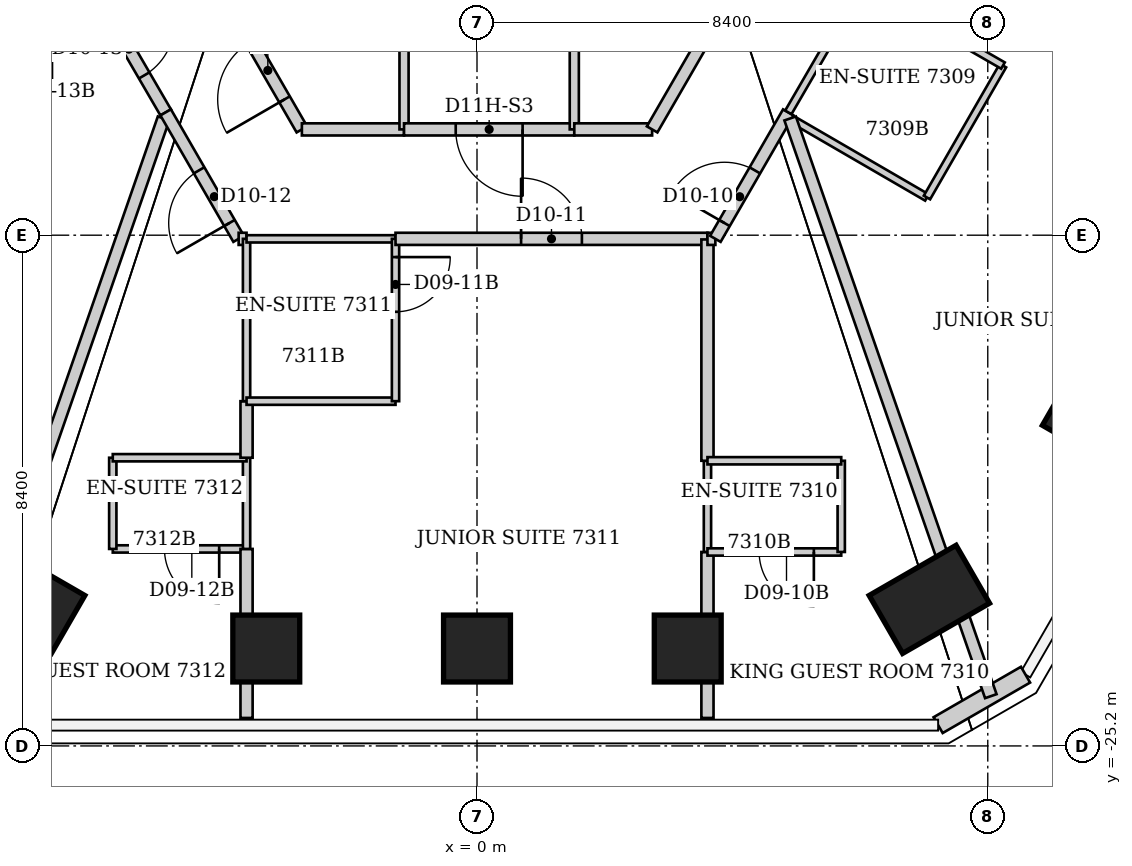
"""IFC4 building model, lengths in metres.
Left out: names, types, materials, properties, quantities, classifications, styles, units other than length and angle.
Written with IfcOpenShell. Run it as: python <this file> out.ifc"""

import sys

from ifc_helpers import new_model, si_unit, direction, frame, frame_2d, origin, origin_2d, place, context, subcontext, project, spatial, rectangle, extrude, element, fill, save


model = new_model("IFC4")
c1 = context("Model", 3, precision=1e-05, world=origin(), true_north=direction((0.0, 1.0)))
c2 = subcontext(c1, "Body", "Model", "MODEL_VIEW")
j1 = project(units=[si_unit("LENGTHUNIT", "METRE"), si_unit("PLANEANGLEUNIT", "RADIAN")], contexts=[c1])
p1 = place(None, origin())
s1 = spatial("IfcSite", under=j1, at=p1, CompositionType="ELEMENT")
p2 = place(p1, origin())
s2 = spatial("IfcBuilding", under=s1, at=p2, CompositionType="ELEMENT")
p3 = place(p2, frame((0.0, 0.0, 291.2)))
s3 = spatial("IfcBuildingStorey", under=s2, at=p3, CompositionType="ELEMENT", Elevation=291.2)
p4 = place(p3, frame((10.05, -19.725, 0.0), z_axis=(0.0, 0.0, 1.0), x_axis=(0.866025403784, -0.5, 0.0)))
e1 = element("IfcColumn", 1, at=p4, inside=s3, PredefinedType="COLUMN", context=c2, shape_type="SweptSolid", body=[
    extrude(rectangle(XDim=1.1, YDim=1.1, at=origin_2d()), origin(), (0.0, 0.0, 1.0), 3.8),
])
p5 = place(p3, frame((7.439, -22.79, 0.0), z_axis=(0.0, 0.0, 1.0), x_axis=(0.5, -0.866025403784, 0.0)))
e2 = element("IfcColumn", 2, at=p5, inside=s3, PredefinedType="COLUMN", context=c2, shape_type="SweptSolid", body=[
    extrude(rectangle(XDim=1.1, YDim=1.65, at=origin_2d()), origin(), (0.0, 0.0, 1.0), 3.8),
])
for number, where, z_axis, x_axis in (
    (3, (3.466, -23.598, 0.0), (0.0, 0.0, 1.0), (0.0, -1.0, 0.0)),
    (4, (0.0, -23.598, 0.0), (0.0, 0.0, 1.0), (0.0, -1.0, 0.0)),
    (5, (-3.466, -23.598, 0.0), (0.0, 0.0, 1.0), (0.0, -1.0, 0.0)),
):
    element("IfcColumn", number, at=place(p3, frame(where, z_axis=z_axis, x_axis=x_axis)), inside=s3, PredefinedType="COLUMN", context=c2, shape_type="SweptSolid", body=[
        extrude(rectangle(XDim=1.1, YDim=1.1, at=origin_2d()), origin(), (0.0, 0.0, 1.0), 3.8),
    ])
p6 = place(p3, frame((-7.439, -22.79, 0.0), z_axis=(0.0, 0.0, 1.0), x_axis=(-0.5, -0.866025403784, 0.0)))
e6 = element("IfcColumn", 6, at=p6, inside=s3, PredefinedType="COLUMN", context=c2, shape_type="SweptSolid", body=[
    extrude(rectangle(XDim=1.1, YDim=1.65, at=origin_2d()), origin(), (0.0, 0.0, 1.0), 3.8),
])
p7 = place(p3, frame((9.021, -24.028, 0.0), z_axis=(0.0, 0.0, 1.0), x_axis=(-0.865989634427, -0.500061949227, 0.0)))
e7 = element("IfcWall", 7, at=p7, inside=s3, PredefinedType="SOLIDWALL", context=c2, shape_type="SweptSolid", body=[
    extrude(rectangle(XDim=1.66, YDim=0.3, at=frame_2d((0.83, 0.0))), origin(), (0.0, 0.0, 1.0), 3.64),
])
p8 = place(p3, frame((-8.59, -14.01, 0.0), z_axis=(0.0, 0.0, 1.0), x_axis=(0.865155281359, 0.50150407689, 0.0)))
e8 = element("IfcWall", 8, at=p8, inside=s3, PredefinedType="PARTITIONING", context=c2, shape_type="SweptSolid", body=[
    extrude(rectangle(XDim=2.612, YDim=0.12, at=frame_2d((1.306, 0.0))), origin(), (0.0, 0.0, 1.0), 3.64),
])
p9 = place(p8, frame((1.412, 0.0, 0.0)))
e9 = element("IfcOpeningElement", 9, at=p9, cuts=e8, PredefinedType="OPENING", context=c2, shape_type="SweptSolid", body=[
    extrude(rectangle(XDim=0.9, YDim=2.03, at=frame_2d((0.45, 1.015))), frame((0.0, 0.06, 0.0), z_axis=(0.0, -1.0, 0.0), x_axis=(1.0, 0.0, 0.0)), (0.0, 0.0, 1.0), 0.12),
])
p10 = place(p3, frame((-8.45, -24.382, 0.0), z_axis=(0.0, 0.0, 1.0), x_axis=(0.327695764917, 0.944783300898, 0.0)))
e10 = element("IfcWall", 10, at=p10, inside=s3, PredefinedType="PARTITIONING", context=c2, shape_type="SweptSolid", body=[
    extrude(rectangle(XDim=10.058, YDim=0.2, at=frame_2d((5.029, 0.0))), origin(), (0.0, 0.0, 1.0), 3.64),
])
p11 = place(p3, frame((-6.33, -12.7, 0.0), z_axis=(0.0, 0.0, 1.0), x_axis=(0.502810888564, -0.864396442809, 0.0)))
e11 = element("IfcWall", 11, at=p11, inside=s3, PredefinedType="PARTITIONING", context=c2, shape_type="SweptSolid", body=[
    extrude(rectangle(XDim=2.406, YDim=0.2, at=frame_2d((1.203, 0.0))), origin(), (0.0, 0.0, 1.0), 3.64),
])
p12 = place(p11, frame((0.703, 0.0, 0.0)))
e12 = element("IfcOpeningElement", 12, at=p12, cuts=e11, PredefinedType="OPENING", context=c2, shape_type="SweptSolid", body=[
    extrude(rectangle(XDim=1.0, YDim=2.13, at=frame_2d((0.5, 1.065))), frame((0.0, 0.1, 0.0), z_axis=(0.0, -1.0, 0.0), x_axis=(1.0, 0.0, 0.0)), (0.0, 0.0, 1.0), 0.2),
])
p13 = place(p3, frame((-5.99, -21.96, 0.0), z_axis=(0.0, 0.0, 1.0), x_axis=(1.0, 0.0, 0.0)))
e13 = element("IfcWall", 13, at=p13, inside=s3, PredefinedType="PARTITIONING", context=c2, shape_type="SweptSolid", body=[
    extrude(rectangle(XDim=2.2, YDim=0.12, at=frame_2d((1.1, 0.0))), origin(), (0.0, 0.0, 1.0), 3.64),
])
p14 = place(p13, frame((0.85, 0.0, 0.0)))
e14 = element("IfcOpeningElement", 14, at=p14, cuts=e13, PredefinedType="OPENING", context=c2, shape_type="SweptSolid", body=[
    extrude(rectangle(XDim=0.9, YDim=2.03, at=frame_2d((0.45, 1.015))), frame((0.0, 0.06, 0.0), z_axis=(0.0, -1.0, 0.0), x_axis=(1.0, 0.0, 0.0)), (0.0, 0.0, 1.0), 0.12),
])
p15 = place(p3, frame((-5.99, -20.46, 0.0), z_axis=(0.0, 0.0, 1.0), x_axis=(0.0, -1.0, 0.0)))
e15 = element("IfcWall", 15, at=p15, inside=s3, PredefinedType="PARTITIONING", context=c2, shape_type="SweptSolid", body=[
    extrude(rectangle(XDim=1.5, YDim=0.12, at=frame_2d((0.75, 0.0))), origin(), (0.0, 0.0, 1.0), 3.64),
])
p16 = place(p3, frame((-5.12, -14.78, 0.0), z_axis=(0.0, 0.0, 1.0), x_axis=(0.499813401482, -0.866133109688, 0.0)))
e16 = element("IfcWall", 16, at=p16, inside=s3, PredefinedType="PARTITIONING", context=c2, shape_type="SweptSolid", body=[
    extrude(rectangle(XDim=2.401, YDim=0.2, at=frame_2d((1.201, 0.0))), origin(), (0.0, 0.0, 1.0), 3.64),
])
p17 = place(p16, frame((1.1, 0.0, 0.0)))
e17 = element("IfcOpeningElement", 17, at=p17, cuts=e16, PredefinedType="OPENING", context=c2, shape_type="SweptSolid", body=[
    extrude(rectangle(XDim=1.0, YDim=2.13, at=frame_2d((0.5, 1.065))), frame((0.0, 0.1, 0.0), z_axis=(0.0, -1.0, 0.0), x_axis=(1.0, 0.0, 0.0)), (0.0, 0.0, 1.0), 0.2),
])
p18 = place(p3, frame((-3.92, -16.86, 0.0), z_axis=(0.0, 0.0, 1.0), x_axis=(1.0, 0.0, 0.0)))
e18 = element("IfcWall", 18, at=p18, inside=s3, PredefinedType="PARTITIONING", context=c2, shape_type="SweptSolid", body=[
    extrude(rectangle(XDim=0.13, YDim=0.2, at=frame_2d((0.065, 0.0))), origin(), (0.0, 0.0, 1.0), 3.64),
])
p19 = place(p3, frame((-3.79, -24.74, 0.0), z_axis=(0.0, 0.0, 1.0), x_axis=(0.0, 1.0, 0.0)))
e19 = element("IfcWall", 19, at=p19, inside=s3, PredefinedType="PARTITIONING", context=c2, shape_type="SweptSolid", body=[
    extrude(rectangle(XDim=2.78, YDim=0.2, at=frame_2d((1.39, 0.0))), origin(), (0.0, 0.0, 1.0), 3.64),
])
p20 = place(p3, frame((-3.79, -21.96, 0.0), z_axis=(0.0, 0.0, 1.0), x_axis=(0.0, 1.0, 0.0)))
e20 = element("IfcWall", 20, at=p20, inside=s3, PredefinedType="PARTITIONING", context=c2, shape_type="SweptSolid", body=[
    extrude(rectangle(XDim=1.5, YDim=0.12, at=frame_2d((0.75, 0.0))), origin(), (0.0, 0.0, 1.0), 3.64),
])
p21 = place(p3, frame((-3.79, -20.46, 0.0), z_axis=(0.0, 0.0, 1.0), x_axis=(-1.0, 0.0, 0.0)))
e21 = element("IfcWall", 21, at=p21, inside=s3, PredefinedType="PARTITIONING", context=c2, shape_type="SweptSolid", body=[
    extrude(rectangle(XDim=2.2, YDim=0.12, at=frame_2d((1.1, 0.0))), origin(), (0.0, 0.0, 1.0), 3.64),
])
p22 = place(p3, frame((-3.79, -20.46, 0.0), z_axis=(0.0, 0.0, 1.0), x_axis=(0.0, 1.0, 0.0)))
e22 = element("IfcWall", 22, at=p22, inside=s3, PredefinedType="PARTITIONING", context=c2, shape_type="SweptSolid", body=[
    extrude(rectangle(XDim=0.93, YDim=0.2, at=frame_2d((0.465, 0.0))), origin(), (0.0, 0.0, 1.0), 3.64),
])
p23 = place(p3, frame((-3.79, -19.53, 0.0), z_axis=(0.0, 0.0, 1.0), x_axis=(0.0, 1.0, 0.0)))
e23 = element("IfcWall", 23, at=p23, inside=s3, PredefinedType="PARTITIONING", context=c2, shape_type="SweptSolid", body=[
    extrude(rectangle(XDim=2.67, YDim=0.12, at=frame_2d((1.335, 0.0))), origin(), (0.0, 0.0, 1.0), 3.64),
])
for number, where, z_axis, x_axis in (
    (24, (-3.79, -19.53, 0.0), (0.0, 0.0, 1.0), (1.0, 0.0, 0.0)),
    (25, (-3.79, -16.86, 0.0), (0.0, 0.0, 1.0), (1.0, 0.0, 0.0)),
):
    element("IfcWall", number, at=place(p3, frame(where, z_axis=z_axis, x_axis=x_axis)), inside=s3, PredefinedType="PARTITIONING", context=c2, shape_type="SweptSolid", body=[
        extrude(rectangle(XDim=2.45, YDim=0.12, at=frame_2d((1.225, 0.0))), origin(), (0.0, 0.0, 1.0), 3.64),
    ])
p24 = place(p3, frame((-2.88, -15.06, 0.0), z_axis=(0.0, 0.0, 1.0), x_axis=(-0.499983441833, 0.866034963436, 0.0)))
e26 = element("IfcWall", 26, at=p24, inside=s3, PredefinedType="PARTITIONING", context=c2, shape_type="SweptSolid", body=[
    extrude(rectangle(XDim=2.24, YDim=0.2, at=frame_2d((1.12, 0.0))), origin(), (0.0, 0.0, 1.0), 3.64),
])
p25 = place(p24, frame((0.57, 0.0, 0.0)))
e27 = element("IfcOpeningElement", 27, at=p25, cuts=e26, PredefinedType="OPENING", context=c2, shape_type="SweptSolid", body=[
    extrude(rectangle(XDim=1.1, YDim=2.2, at=frame_2d((0.55, 1.1))), frame((0.0, 0.1, 0.0), z_axis=(0.0, -1.0, 0.0), x_axis=(1.0, 0.0, 0.0)), (0.0, 0.0, 1.0), 0.2),
])
p26 = place(p3, frame((-1.34, -19.53, 0.0), z_axis=(0.0, 0.0, 1.0), x_axis=(0.0, 1.0, 0.0)))
e28 = element("IfcWall", 28, at=p26, inside=s3, PredefinedType="PARTITIONING", context=c2, shape_type="SweptSolid", body=[
    extrude(rectangle(XDim=2.67, YDim=0.12, at=frame_2d((1.335, 0.0))), origin(), (0.0, 0.0, 1.0), 3.64),
])
p27 = place(p26, frame((1.47, 0.0, 0.0)))
e29 = element("IfcOpeningElement", 29, at=p27, cuts=e28, PredefinedType="OPENING", context=c2, shape_type="SweptSolid", body=[
    extrude(rectangle(XDim=0.9, YDim=2.03, at=frame_2d((0.45, 1.015))), frame((0.0, 0.06, 0.0), z_axis=(0.0, -1.0, 0.0), x_axis=(1.0, 0.0, 0.0)), (0.0, 0.0, 1.0), 0.12),
])
p28 = place(p3, frame((-1.34, -16.86, 0.0), z_axis=(0.0, 0.0, 1.0), x_axis=(1.0, 0.0, 0.0)))
e30 = element("IfcWall", 30, at=p28, inside=s3, PredefinedType="PARTITIONING", context=c2, shape_type="SweptSolid", body=[
    extrude(rectangle(XDim=5.13, YDim=0.2, at=frame_2d((2.565, 0.0))), origin(), (0.0, 0.0, 1.0), 3.64),
])
p29 = place(p28, frame((2.065, 0.0, 0.0)))
e31 = element("IfcOpeningElement", 31, at=p29, cuts=e30, PredefinedType="OPENING", context=c2, shape_type="SweptSolid", body=[
    extrude(rectangle(XDim=1.0, YDim=2.13, at=frame_2d((0.5, 1.065))), frame((0.0, 0.1, 0.0), z_axis=(0.0, -1.0, 0.0), x_axis=(1.0, 0.0, 0.0)), (0.0, 0.0, 1.0), 0.2),
])
p30 = place(p3, frame((-1.2, -15.06, 0.0), z_axis=(0.0, 0.0, 1.0), x_axis=(-1.0, 0.0, 0.0)))
e32 = element("IfcWall", 32, at=p30, inside=s3, PredefinedType="PARTITIONING", context=c2, shape_type="SweptSolid", body=[
    extrude(rectangle(XDim=1.68, YDim=0.2, at=frame_2d((0.84, 0.0))), origin(), (0.0, 0.0, 1.0), 3.64),
])
p31 = place(p3, frame((-1.2, -6.7, 0.0), z_axis=(0.0, 0.0, 1.0), x_axis=(0.0, -1.0, 0.0)))
e33 = element("IfcWall", 33, at=p31, inside=s3, PredefinedType="PARTITIONING", context=c2, shape_type="SweptSolid", body=[
    extrude(rectangle(XDim=8.36, YDim=0.15, at=frame_2d((4.18, 0.0))), origin(), (0.0, 0.0, 1.0), 3.64),
])
p32 = place(p3, frame((1.6, -15.06, 0.0), z_axis=(0.0, 0.0, 1.0), x_axis=(-1.0, 0.0, 0.0)))
e34 = element("IfcWall", 34, at=p32, inside=s3, PredefinedType="PARTITIONING", context=c2, shape_type="SweptSolid", body=[
    extrude(rectangle(XDim=2.8, YDim=0.2, at=frame_2d((1.4, 0.0))), origin(), (0.0, 0.0, 1.0), 3.64),
])
p33 = place(p32, frame((0.85, 0.0, 0.0)))
e35 = element("IfcOpeningElement", 35, at=p33, cuts=e34, PredefinedType="OPENING", context=c2, shape_type="SweptSolid", body=[
    extrude(rectangle(XDim=1.1, YDim=2.2, at=frame_2d((0.55, 1.1))), frame((0.0, 0.1, 0.0), z_axis=(0.0, -1.0, 0.0), x_axis=(1.0, 0.0, 0.0)), (0.0, 0.0, 1.0), 0.2),
])
p34 = place(p3, frame((1.6, -6.7, 0.0), z_axis=(0.0, 0.0, 1.0), x_axis=(0.0, -1.0, 0.0)))
e36 = element("IfcWall", 36, at=p34, inside=s3, PredefinedType="PARTITIONING", context=c2, shape_type="SweptSolid", body=[
    extrude(rectangle(XDim=8.36, YDim=0.15, at=frame_2d((4.18, 0.0))), origin(), (0.0, 0.0, 1.0), 2.86),
])
p35 = place(p3, frame((2.88, -15.06, 0.0), z_axis=(0.0, 0.0, 1.0), x_axis=(-1.0, 0.0, 0.0)))
e37 = element("IfcWall", 37, at=p35, inside=s3, PredefinedType="PARTITIONING", context=c2, shape_type="SweptSolid", body=[
    extrude(rectangle(XDim=1.28, YDim=0.2, at=frame_2d((0.64, 0.0))), origin(), (0.0, 0.0, 1.0), 3.64),
])
p36 = place(p3, frame((3.79, -24.74, 0.0), z_axis=(0.0, 0.0, 1.0), x_axis=(0.0, 1.0, 0.0)))
e38 = element("IfcWall", 38, at=p36, inside=s3, PredefinedType="PARTITIONING", context=c2, shape_type="SweptSolid", body=[
    extrude(rectangle(XDim=2.73, YDim=0.2, at=frame_2d((1.365, 0.0))), origin(), (0.0, 0.0, 1.0), 3.64),
])
p37 = place(p3, frame((3.79, -22.01, 0.0), z_axis=(0.0, 0.0, 1.0), x_axis=(0.0, 1.0, 0.0)))
e39 = element("IfcWall", 39, at=p37, inside=s3, PredefinedType="PARTITIONING", context=c2, shape_type="SweptSolid", body=[
    extrude(rectangle(XDim=1.5, YDim=0.12, at=frame_2d((0.75, 0.0))), origin(), (0.0, 0.0, 1.0), 3.64),
])
p38 = place(p3, frame((3.79, -22.01, 0.0), z_axis=(0.0, 0.0, 1.0), x_axis=(1.0, 0.0, 0.0)))
e40 = element("IfcWall", 40, at=p38, inside=s3, PredefinedType="PARTITIONING", context=c2, shape_type="SweptSolid", body=[
    extrude(rectangle(XDim=2.2, YDim=0.12, at=frame_2d((1.1, 0.0))), origin(), (0.0, 0.0, 1.0), 3.64),
])
p39 = place(p38, frame((0.85, 0.0, 0.0)))
e41 = element("IfcOpeningElement", 41, at=p39, cuts=e40, PredefinedType="OPENING", context=c2, shape_type="SweptSolid", body=[
    extrude(rectangle(XDim=0.9, YDim=2.03, at=frame_2d((0.45, 1.015))), frame((0.0, 0.06, 0.0), z_axis=(0.0, -1.0, 0.0), x_axis=(1.0, 0.0, 0.0)), (0.0, 0.0, 1.0), 0.12),
])
p40 = place(p3, frame((3.79, -20.51, 0.0), z_axis=(0.0, 0.0, 1.0), x_axis=(0.0, 1.0, 0.0)))
e42 = element("IfcWall", 42, at=p40, inside=s3, PredefinedType="PARTITIONING", context=c2, shape_type="SweptSolid", body=[
    extrude(rectangle(XDim=3.64, YDim=0.2, at=frame_2d((1.82, 0.0))), origin(), (0.0, 0.0, 1.0), 3.64),
])
p41 = place(p3, frame((3.79, -16.86, 0.0), z_axis=(0.0, 0.0, 1.0), x_axis=(1.0, 0.0, 0.0)))
e43 = element("IfcWall", 43, at=p41, inside=s3, PredefinedType="PARTITIONING", context=c2, shape_type="SweptSolid", body=[
    extrude(rectangle(XDim=0.13, YDim=0.2, at=frame_2d((0.065, 0.0))), origin(), (0.0, 0.0, 1.0), 3.64),
])
p42 = place(p3, frame((3.92, -16.86, 0.0), z_axis=(0.0, 0.0, 1.0), x_axis=(0.499693115345, 0.866202511239, 0.0)))
e44 = element("IfcWall", 44, at=p42, inside=s3, PredefinedType="PARTITIONING", context=c2, shape_type="SweptSolid", body=[
    extrude(rectangle(XDim=2.401, YDim=0.2, at=frame_2d((1.201, 0.0))), origin(), (0.0, 0.0, 1.0), 3.64),
])
p43 = place(p42, frame((0.3, 0.0, 0.0)))
e45 = element("IfcOpeningElement", 45, at=p43, cuts=e44, PredefinedType="OPENING", context=c2, shape_type="SweptSolid", body=[
    extrude(rectangle(XDim=1.0, YDim=2.13, at=frame_2d((0.5, 1.065))), frame((0.0, 0.1, 0.0), z_axis=(0.0, -1.0, 0.0), x_axis=(1.0, 0.0, 0.0)), (0.0, 0.0, 1.0), 0.2),
])
p44 = place(p3, frame((5.12, -14.78, 0.0), z_axis=(0.0, 0.0, 1.0), x_axis=(0.502307685327, 0.86468895521, 0.0)))
e46 = element("IfcWall", 46, at=p44, inside=s3, PredefinedType="PARTITIONING", context=c2, shape_type="SweptSolid", body=[
    extrude(rectangle(XDim=2.429, YDim=0.12, at=frame_2d((1.214, 0.0))), origin(), (0.0, 0.0, 1.0), 3.64),
])
p45 = place(p3, frame((5.233, -14.923, 0.0), z_axis=(0.0, 0.0, 1.0), x_axis=(0.864900876675, -0.501942699445, 0.0)))
e47 = element("IfcWall", 47, at=p45, inside=s3, PredefinedType="PARTITIONING", context=c2, shape_type="SweptSolid", body=[
    extrude(rectangle(XDim=2.505, YDim=0.12, at=frame_2d((1.252, 0.0))), origin(), (0.0, 0.0, 1.0), 3.038),
])
p46 = place(p3, frame((5.99, -22.01, 0.0), z_axis=(0.0, 0.0, 1.0), x_axis=(0.0, 1.0, 0.0)))
e48 = element("IfcWall", 48, at=p46, inside=s3, PredefinedType="PARTITIONING", context=c2, shape_type="SweptSolid", body=[
    extrude(rectangle(XDim=1.5, YDim=0.12, at=frame_2d((0.75, 0.0))), origin(), (0.0, 0.0, 1.0), 3.64),
])
p47 = place(p3, frame((5.99, -20.51, 0.0), z_axis=(0.0, 0.0, 1.0), x_axis=(-1.0, 0.0, 0.0)))
e49 = element("IfcWall", 49, at=p47, inside=s3, PredefinedType="PARTITIONING", context=c2, shape_type="SweptSolid", body=[
    extrude(rectangle(XDim=2.2, YDim=0.12, at=frame_2d((1.1, 0.0))), origin(), (0.0, 0.0, 1.0), 3.64),
])
p48 = place(p3, frame((7.4, -16.18, 0.0), z_axis=(0.0, 0.0, 1.0), x_axis=(0.499159685399, 0.866510016372, 0.0)))
e50 = element("IfcWall", 50, at=p48, inside=s3, PredefinedType="PARTITIONING", context=c2, shape_type="SweptSolid", body=[
    extrude(rectangle(XDim=2.504, YDim=0.12, at=frame_2d((1.252, 0.0))), origin(), (0.0, 0.0, 1.0), 3.64),
])
p49 = place(p3, frame((7.68, -6.75, 0.0), z_axis=(0.0, 0.0, 1.0), x_axis=(-0.500174600737, -0.865924574532, 0.0)))
e51 = element("IfcWall", 51, at=p49, inside=s3, PredefinedType="PARTITIONING", context=c2, shape_type="SweptSolid", body=[
    extrude(rectangle(XDim=9.597, YDim=0.2, at=frame_2d((4.798, 0.0))), origin(), (0.0, 0.0, 1.0), 3.64),
])
p50 = place(p49, frame((4.248, 0.0, 0.0)))
e52 = element("IfcOpeningElement", 52, at=p50, cuts=e51, PredefinedType="OPENING", context=c2, shape_type="SweptSolid", body=[
    extrude(rectangle(XDim=1.1, YDim=2.2, at=frame_2d((0.55, 1.1))), frame((0.0, 0.1, 0.0), z_axis=(0.0, -1.0, 0.0), x_axis=(1.0, 0.0, 0.0)), (0.0, 0.0, 1.0), 0.2),
])
p51 = place(p3, frame((8.45, -24.382, 0.0), z_axis=(0.0, 0.0, 1.0), x_axis=(-0.328108256954, 0.944640128154, 0.0)))
e53 = element("IfcWall", 53, at=p51, inside=s3, PredefinedType="PARTITIONING", context=c2, shape_type="SweptSolid", body=[
    extrude(rectangle(XDim=10.059, YDim=0.2, at=frame_2d((5.029, 0.0))), origin(), (0.0, 0.0, 1.0), 3.64),
])
p52 = place(p3, frame((8.65, -14.01, 0.0), z_axis=(0.0, 0.0, 1.0), x_axis=(-0.866592449628, 0.499016559092, 0.0)))
e54 = element("IfcWall", 54, at=p52, inside=s3, PredefinedType="PARTITIONING", context=c2, shape_type="SweptSolid", body=[
    extrude(rectangle(XDim=2.665, YDim=0.12, at=frame_2d((1.333, 0.0))), origin(), (0.0, 0.0, 1.0), 3.64),
])
p53 = place(p52, frame((1.466, 0.0, 0.0)))
e55 = element("IfcOpeningElement", 55, at=p53, cuts=e54, PredefinedType="OPENING", context=c2, shape_type="SweptSolid", body=[
    extrude(rectangle(XDim=0.9, YDim=2.03, at=frame_2d((0.45, 1.015))), frame((0.0, 0.06, 0.0), z_axis=(0.0, -1.0, 0.0), x_axis=(1.0, 0.0, 0.0)), (0.0, 0.0, 1.0), 0.12),
])
p54 = place(p43, origin())
e56 = element("IfcDoor", 56, at=p54, inside=s3, OperationType="SINGLE_SWING_LEFT", PredefinedType="DOOR", context=c2, shape_type="SweptSolid", body=[
    extrude(rectangle(XDim=1.0, YDim=2.13, at=frame_2d((0.5, 1.065))), frame((0.0, 0.025, 0.0), z_axis=(0.0, -1.0, 0.0), x_axis=(1.0, 0.0, 0.0)), (0.0, 0.0, 1.0), 0.05),
])
fill(e45, e56)
p55 = place(p39, origin())
e57 = element("IfcDoor", 57, at=p55, inside=s3, OperationType="SINGLE_SWING_RIGHT", PredefinedType="DOOR", context=c2, shape_type="SweptSolid", body=[
    extrude(rectangle(XDim=0.9, YDim=2.03, at=frame_2d((0.45, 1.015))), frame((0.0, 0.025, 0.0), z_axis=(0.0, -1.0, 0.0), x_axis=(1.0, 0.0, 0.0)), (0.0, 0.0, 1.0), 0.05),
])
fill(e41, e57)
p56 = place(p29, origin())
e58 = element("IfcDoor", 58, at=p56, inside=s3, OperationType="SINGLE_SWING_LEFT", PredefinedType="DOOR", context=c2, shape_type="SweptSolid", body=[
    extrude(rectangle(XDim=1.0, YDim=2.13, at=frame_2d((0.5, 1.065))), frame((0.0, 0.025, 0.0), z_axis=(0.0, -1.0, 0.0), x_axis=(1.0, 0.0, 0.0)), (0.0, 0.0, 1.0), 0.05),
])
fill(e31, e58)
p57 = place(p27, origin())
e59 = element("IfcDoor", 59, at=p57, inside=s3, OperationType="SINGLE_SWING_RIGHT", PredefinedType="DOOR", context=c2, shape_type="SweptSolid", body=[
    extrude(rectangle(XDim=0.9, YDim=2.03, at=frame_2d((0.45, 1.015))), frame((0.0, 0.025, 0.0), z_axis=(0.0, -1.0, 0.0), x_axis=(1.0, 0.0, 0.0)), (0.0, 0.0, 1.0), 0.05),
])
fill(e29, e59)
p58 = place(p17, origin())
e60 = element("IfcDoor", 60, at=p58, inside=s3, OperationType="SINGLE_SWING_RIGHT", PredefinedType="DOOR", context=c2, shape_type="SweptSolid", body=[
    extrude(rectangle(XDim=1.0, YDim=2.13, at=frame_2d((0.5, 1.065))), frame((0.0, 0.025, 0.0), z_axis=(0.0, -1.0, 0.0), x_axis=(1.0, 0.0, 0.0)), (0.0, 0.0, 1.0), 0.05),
])
fill(e17, e60)
p59 = place(p14, origin())
e61 = element("IfcDoor", 61, at=p59, inside=s3, OperationType="SINGLE_SWING_RIGHT", PredefinedType="DOOR", context=c2, shape_type="SweptSolid", body=[
    extrude(rectangle(XDim=0.9, YDim=2.03, at=frame_2d((0.45, 1.015))), frame((0.0, 0.025, 0.0), z_axis=(0.0, -1.0, 0.0), x_axis=(1.0, 0.0, 0.0)), (0.0, 0.0, 1.0), 0.05),
])
fill(e14, e61)
p60 = place(p12, origin())
e62 = element("IfcDoor", 62, at=p60, inside=s3, OperationType="SINGLE_SWING_LEFT", PredefinedType="DOOR", context=c2, shape_type="SweptSolid", body=[
    extrude(rectangle(XDim=1.0, YDim=2.13, at=frame_2d((0.5, 1.065))), frame((0.0, 0.025, 0.0), z_axis=(0.0, -1.0, 0.0), x_axis=(1.0, 0.0, 0.0)), (0.0, 0.0, 1.0), 0.05),
])
fill(e12, e62)
p61 = place(p25, origin())
e63 = element("IfcDoor", 63, at=p61, inside=s3, OperationType="SINGLE_SWING_LEFT", PredefinedType="DOOR", context=c2, shape_type="SweptSolid", body=[
    extrude(rectangle(XDim=1.1, YDim=2.2, at=frame_2d((0.55, 1.1))), frame((0.0, 0.025, 0.0), z_axis=(0.0, -1.0, 0.0), x_axis=(1.0, 0.0, 0.0)), (0.0, 0.0, 1.0), 0.05),
])
fill(e27, e63)
p62 = place(p33, origin())
e64 = element("IfcDoor", 64, at=p62, inside=s3, OperationType="SINGLE_SWING_LEFT", PredefinedType="DOOR", context=c2, shape_type="SweptSolid", body=[
    extrude(rectangle(XDim=1.1, YDim=2.2, at=frame_2d((0.55, 1.1))), frame((0.0, 0.025, 0.0), z_axis=(0.0, -1.0, 0.0), x_axis=(1.0, 0.0, 0.0)), (0.0, 0.0, 1.0), 0.05),
])
fill(e35, e64)
save(model, sys.argv[1])
